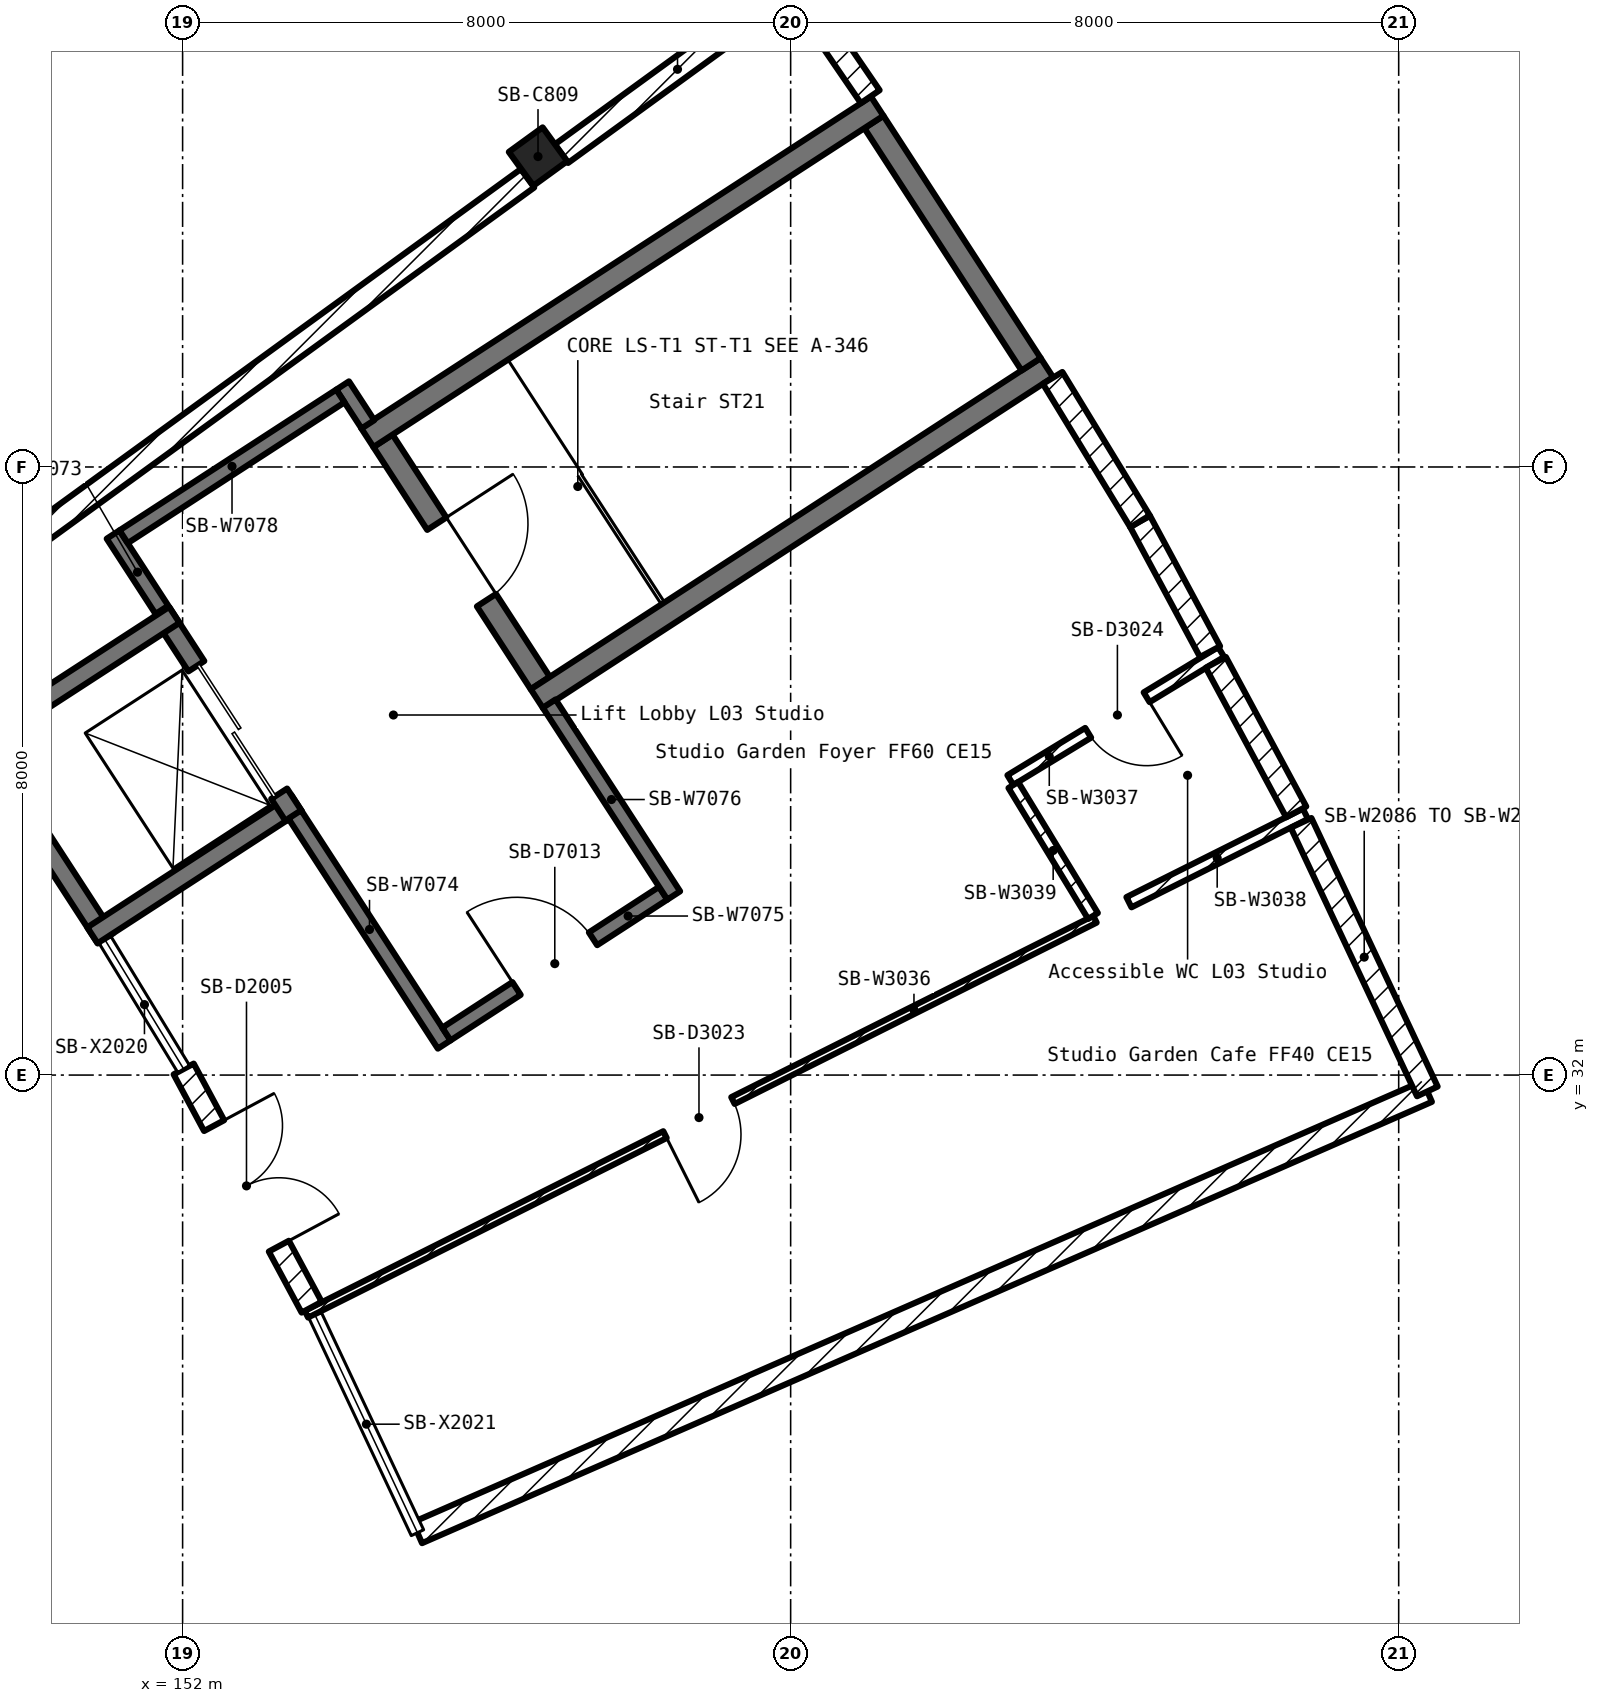
"""IFC4 building model, lengths in metres.
Left out: names, types, materials, properties, quantities, classifications, styles, units other than length and angle.
Written with IfcOpenShell. Run it as: python <this file> out.ifc"""

import sys

from ifc_helpers import new_model, si_unit, direction, frame, frame_2d, origin, origin_2d, place, context, subcontext, project, spatial, rectangle, extrude, element, fill, save


model = new_model("IFC4")
c1 = context("Model", 3, precision=1e-05, world=origin(), true_north=direction((0.0, 1.0)))
c2 = subcontext(c1, "Body", "Model", "MODEL_VIEW")
j1 = project(units=[si_unit("LENGTHUNIT", "METRE"), si_unit("PLANEANGLEUNIT", "RADIAN")], contexts=[c1])
p1 = place(None, origin())
s1 = spatial("IfcSite", under=j1, at=p1, CompositionType="ELEMENT")
p2 = place(p1, origin())
s2 = spatial("IfcBuilding", under=s1, at=p2, CompositionType="ELEMENT")
p3 = place(p2, frame((0.0, 0.0, 17.0)))
s3 = spatial("IfcBuildingStorey", under=s2, at=p3, CompositionType="ELEMENT", Elevation=17.0)
p4 = place(p3, frame((156.676, 44.084, 0.0), z_axis=(0.0, 0.0, 1.0), x_axis=(0.587785252292, -0.809016994375, 0.0)))
e1 = element("IfcColumn", 1, at=p4, inside=s3, PredefinedType="COLUMN", context=c2, shape_type="SweptSolid", body=[
    extrude(rectangle(XDim=0.55, YDim=0.55, at=origin_2d()), origin(), (0.0, 0.0, 1.0), 4.2),
])
p5 = place(p3, frame((149.708, 45.36, 0.0), z_axis=(0.0, 0.0, 1.0), x_axis=(0.766086094987, 0.642737967657, 0.0)))
e2 = element("IfcWall", 2, at=p5, inside=s3, PredefinedType="SOLIDWALL", context=c2, shape_type="SweptSolid", body=[
    extrude(rectangle(XDim=5.7, YDim=0.45, at=frame_2d((2.85, 0.0))), origin(), (0.0, 0.0, 1.0), 4.48),
])
p6 = place(p5, frame((1.85, 0.0, 1.0)))
e3 = element("IfcOpeningElement", 3, at=p6, cuts=e2, PredefinedType="OPENING", context=c2, shape_type="SweptSolid", body=[
    extrude(rectangle(XDim=2.0, YDim=2.8, at=frame_2d((1.0, 1.4))), frame((0.0, 0.237, 0.0), z_axis=(0.0, -1.0, 0.0), x_axis=(1.0, 0.0, 0.0)), (0.0, 0.0, 1.0), 0.474),
])
p7 = place(p3, frame((147.477, 28.401, 0.0), z_axis=(0.0, 0.0, 1.0), x_axis=(0.374633501724, -0.92717298245, 0.0)))
e4 = element("IfcWall", 4, at=p7, inside=s3, PredefinedType="PARAPET", context=c2, shape_type="SweptSolid", body=[
    extrude(rectangle(XDim=7.199, YDim=0.3, at=frame_2d((3.6, 0.0))), origin(), (0.0, 0.0, 1.0), 1.1),
])
p8 = place(p3, frame((154.636, 40.344, 0.0), z_axis=(0.0, 0.0, 1.0), x_axis=(0.544712834543, -0.838622637355, 0.0)))
e5 = element("IfcWall", 5, at=p8, inside=s3, PredefinedType="SOLIDWALL", context=c2, shape_type="SweptSolid", body=[
    extrude(rectangle(XDim=3.8, YDim=0.3, at=frame_2d((1.9, 0.0))), origin(), (0.0, 0.0, 1.0), 4.2),
])
p9 = place(p8, frame((1.3, 0.0, 0.0)))
e6 = element("IfcOpeningElement", 6, at=p9, cuts=e5, PredefinedType="OPENING", context=c2, shape_type="SweptSolid", body=[
    extrude(rectangle(XDim=1.2, YDim=2.1, at=frame_2d((0.6, 1.05))), frame((0.0, 0.162, 0.0), z_axis=(0.0, -1.0, 0.0), x_axis=(1.0, 0.0, 0.0)), (0.0, 0.0, 1.0), 0.324),
])
p10 = place(p3, frame((156.662, 36.95, 0.0), z_axis=(0.0, 0.0, 1.0), x_axis=(0.838666673849, 0.544645031351, 0.0)))
e7 = element("IfcWall", 7, at=p10, inside=s3, PredefinedType="SOLIDWALL", context=c2, shape_type="SweptSolid", body=[
    extrude(rectangle(XDim=8.0, YDim=0.3, at=frame_2d((4.0, 0.0))), origin(), (0.0, 0.0, 1.0), 4.2),
])
p11 = place(p3, frame((163.164, 41.351, 0.0), z_axis=(0.0, 0.0, 1.0), x_axis=(-0.544414712312, 0.838816202167, 0.0)))
e8 = element("IfcWall", 8, at=p11, inside=s3, PredefinedType="SOLIDWALL", context=c2, shape_type="SweptSolid", body=[
    extrude(rectangle(XDim=3.801, YDim=0.3, at=frame_2d((1.9, 0.0))), origin(), (0.0, 0.0, 1.0), 4.2),
])
p12 = place(p3, frame((161.139, 44.746, 0.0), z_axis=(0.0, 0.0, 1.0), x_axis=(-0.838633189021, -0.544696589187, 0.0)))
e9 = element("IfcWall", 9, at=p12, inside=s3, PredefinedType="SOLIDWALL", context=c2, shape_type="SweptSolid", body=[
    extrude(rectangle(XDim=8.001, YDim=0.3, at=frame_2d((4.0, 0.0))), origin(), (0.0, 0.0, 1.0), 4.2),
])
p13 = place(p3, frame((143.871, 44.123, 0.0), z_axis=(0.0, 0.0, 1.0), x_axis=(0.7070945738, 0.707118988363, 0.0)))
e10 = element("IfcWall", 10, at=p13, inside=s3, PredefinedType="SOLIDWALL", context=c2, shape_type="SweptSolid", body=[
    extrude(rectangle(XDim=10.0, YDim=0.3, at=frame_2d((5.0, 0.0))), origin(), (0.0, 0.0, 1.0), 5.5),
])
for number, where, z_axis, x_axis in (
    (11, (149.244, 36.485, 0.0), (0.0, 0.0, 1.0), (0.545, -0.839, 0.0)),
    (12, (150.814, 33.838, 0.0), (0.0, 0.0, 1.0), (0.839, 0.545, 0.0)),
):
    element("IfcWall", number, at=place(p3, frame(where, z_axis=z_axis, x_axis=x_axis)), inside=s3, PredefinedType="SOLIDWALL", context=c2, shape_type="SweptSolid", body=[
        extrude(rectangle(XDim=3.2, YDim=0.25, at=frame_2d((1.6, 0.0))), origin(), (0.0, 0.0, 1.0), 4.2),
    ])
p14 = place(p3, frame((153.461, 35.408, 0.0), z_axis=(0.0, 0.0, 1.0), x_axis=(-0.544746938909, 0.838600484467, 0.0)))
e13 = element("IfcWall", 13, at=p14, inside=s3, PredefinedType="SOLIDWALL", context=c2, shape_type="SweptSolid", body=[
    extrude(rectangle(XDim=3.199, YDim=0.25, at=frame_2d((1.6, 0.0))), origin(), (0.0, 0.0, 1.0), 4.2),
])
p15 = place(p14, frame((0.35, 0.0, 0.0)))
e14 = element("IfcOpeningElement", 14, at=p15, cuts=e13, PredefinedType="OPENING", context=c2, shape_type="SweptSolid", body=[
    extrude(rectangle(XDim=2.0, YDim=2.2, at=frame_2d((1.0, 1.1))), frame((0.0, 0.137, 0.0), z_axis=(0.0, -1.0, 0.0), x_axis=(1.0, 0.0, 0.0)), (0.0, 0.0, 1.0), 0.274),
])
p16 = place(p3, frame((151.891, 38.054, 0.0), z_axis=(0.0, 0.0, 1.0), x_axis=(-0.838830397361, -0.544392840201, 0.0)))
e15 = element("IfcWall", 15, at=p16, inside=s3, PredefinedType="SOLIDWALL", context=c2, shape_type="SweptSolid", body=[
    extrude(rectangle(XDim=3.2, YDim=0.25, at=frame_2d((1.6, 0.0))), origin(), (0.0, 0.0, 1.0), 4.2),
])
p17 = place(p3, frame((151.085, 39.111, 0.0), z_axis=(0.0, 0.0, 1.0), x_axis=(0.544733903653, -0.838608951903, 0.0)))
e16 = element("IfcWall", 16, at=p17, inside=s3, PredefinedType="PARTITIONING", context=c2, shape_type="SweptSolid", body=[
    extrude(rectangle(XDim=1.18, YDim=0.2, at=frame_2d((0.59, 0.0))), origin(), (0.0, 0.0, 1.0), 4.2),
])
p18 = place(p3, frame((153.476, 35.429, 0.0), z_axis=(0.0, 0.0, 1.0), x_axis=(0.544669706692, -0.838650648728, 0.0)))
e17 = element("IfcWall", 17, at=p18, inside=s3, PredefinedType="PARTITIONING", context=c2, shape_type="SweptSolid", body=[
    extrude(rectangle(XDim=3.609, YDim=0.2, at=frame_2d((1.805, 0.0))), origin(), (0.0, 0.0, 1.0), 4.2),
])
p19 = place(p3, frame((155.471, 32.54, 0.0), z_axis=(0.0, 0.0, 1.0), x_axis=(0.838683012783, 0.544619871167, 0.0)))
e18 = element("IfcWall", 18, at=p19, inside=s3, PredefinedType="PARTITIONING", context=c2, shape_type="SweptSolid", body=[
    extrude(rectangle(XDim=3.401, YDim=0.2, at=frame_2d((1.7, 0.0))), origin(), (0.0, 0.0, 1.0), 4.2),
])
p20 = place(p19, frame((1.1, 0.0, 0.0)))
e19 = element("IfcOpeningElement", 19, at=p20, cuts=e18, PredefinedType="OPENING", context=c2, shape_type="SweptSolid", body=[
    extrude(rectangle(XDim=1.2, YDim=2.1, at=frame_2d((0.6, 1.05))), frame((0.0, 0.112, 0.0), z_axis=(0.0, -1.0, 0.0), x_axis=(1.0, 0.0, 0.0)), (0.0, 0.0, 1.0), 0.224),
])
p21 = place(p3, frame((158.462, 34.363, 0.0), z_axis=(0.0, 0.0, 1.0), x_axis=(-0.544606183959, 0.838691900756, 0.0)))
e20 = element("IfcWall", 20, at=p21, inside=s3, PredefinedType="PARTITIONING", context=c2, shape_type="SweptSolid", body=[
    extrude(rectangle(XDim=3.009, YDim=0.2, at=frame_2d((1.505, 0.0))), origin(), (0.0, 0.0, 1.0), 4.2),
])
p22 = place(p3, frame((154.438, 40.561, 0.0), z_axis=(0.0, 0.0, 1.0), x_axis=(-0.545986914224, 0.837793703424, 0.0)))
e21 = element("IfcWall", 21, at=p22, inside=s3, PredefinedType="PARTITIONING", context=c2, shape_type="SweptSolid", body=[
    extrude(rectangle(XDim=0.61, YDim=0.2, at=frame_2d((0.305, 0.0))), origin(), (0.0, 0.0, 1.0), 4.2),
])
p23 = place(p3, frame((154.076, 40.934, 0.0), z_axis=(0.0, 0.0, 1.0), x_axis=(-0.838661716351, -0.544652665032, 0.0)))
e22 = element("IfcWall", 22, at=p23, inside=s3, PredefinedType="PARTITIONING", context=c2, shape_type="SweptSolid", body=[
    extrude(rectangle(XDim=3.4, YDim=0.2, at=frame_2d((1.7, 0.0))), origin(), (0.0, 0.0, 1.0), 4.2),
])
p24 = place(p3, frame((164.004, 34.05, 0.0), z_axis=(0.0, 0.0, 1.0), x_axis=(-0.894132431513, -0.447802629421, 0.0)))
e23 = element("IfcWall", 23, at=p24, inside=s3, PredefinedType="PARTITIONING", context=c2, shape_type="SweptSolid", body=[
    extrude(rectangle(XDim=11.604, YDim=0.1, at=frame_2d((5.802, 0.0))), origin(), (0.0, 0.0, 1.0), 3.3),
])
p25 = place(p24, frame((5.327, 0.0, 0.0)))
e24 = element("IfcOpeningElement", 24, at=p25, cuts=e23, PredefinedType="OPENING", context=c2, shape_type="SweptSolid", body=[
    extrude(rectangle(XDim=1.0, YDim=2.1, at=frame_2d((0.5, 1.05))), frame((0.0, 0.062, 0.0), z_axis=(0.0, -1.0, 0.0), x_axis=(1.0, 0.0, 0.0)), (0.0, 0.0, 1.0), 0.124),
])
p26 = place(p3, frame((165.664, 37.566, 0.0), z_axis=(0.0, 0.0, 1.0), x_axis=(-0.854618188907, -0.519256922139, 0.0)))
e25 = element("IfcWall", 25, at=p26, inside=s3, PredefinedType="PARTITIONING", context=c2, shape_type="SweptSolid", body=[
    extrude(rectangle(XDim=3.245, YDim=0.15, at=frame_2d((1.622, 0.0))), origin(), (0.0, 0.0, 1.0), 3.3),
])
p27 = place(p26, frame((1.147, 0.0, 0.0)))
e26 = element("IfcOpeningElement", 26, at=p27, cuts=e25, PredefinedType="OPENING", context=c2, shape_type="SweptSolid", body=[
    extrude(rectangle(XDim=0.9, YDim=2.1, at=frame_2d((0.45, 1.05))), frame((0.0, 0.087, 0.0), z_axis=(0.0, -1.0, 0.0), x_axis=(1.0, 0.0, 0.0)), (0.0, 0.0, 1.0), 0.174),
])
p28 = place(p3, frame((166.773, 35.436, 0.0), z_axis=(0.0, 0.0, 1.0), x_axis=(-0.894257884581, -0.447552048218, 0.0)))
e27 = element("IfcWall", 27, at=p28, inside=s3, PredefinedType="PARTITIONING", context=c2, shape_type="SweptSolid", body=[
    extrude(rectangle(XDim=2.597, YDim=0.15, at=frame_2d((1.298, 0.0))), origin(), (0.0, 0.0, 1.0), 3.3),
])
p29 = place(p3, frame((162.93, 35.816, 0.0), z_axis=(0.0, 0.0, 1.0), x_axis=(0.519720333425, -0.854336453059, 0.0)))
e28 = element("IfcWall", 28, at=p29, inside=s3, PredefinedType="PARTITIONING", context=c2, shape_type="SweptSolid", body=[
    extrude(rectangle(XDim=2.017, YDim=0.15, at=frame_2d((1.008, 0.0))), origin(), (0.0, 0.0, 1.0), 3.3),
])
p30 = place(p3, frame((160.04, 46.343, 0.0), z_axis=(0.0, 0.0, 1.0), x_axis=(-0.80891762334, -0.587922000481, 0.0)))
e29 = element("IfcWall", 29, at=p30, inside=s3, PredefinedType="SOLIDWALL", context=c2, shape_type="SweptSolid", body=[
    extrude(rectangle(XDim=3.779, YDim=0.3, at=frame_2d((1.89, 0.0))), origin(), (0.0, 0.0, 1.0), 4.2),
])
p31 = place(p3, frame((156.538, 43.798, 0.0), z_axis=(0.0, 0.0, 1.0), x_axis=(-0.809003782437, -0.587803436536, 0.0)))
e30 = element("IfcWall", 30, at=p31, inside=s3, PredefinedType="SOLIDWALL", context=c2, shape_type="SweptSolid", body=[
    extrude(rectangle(XDim=10.172, YDim=0.3, at=frame_2d((5.086, 0.0))), origin(), (0.0, 0.0, 1.0), 4.2),
])
p32 = place(p3, frame((152.014, 32.08, 0.0), z_axis=(0.0, 0.0, 1.0), x_axis=(0.473342621424, -0.880878404062, 0.0)))
e31 = element("IfcWall", 31, at=p32, inside=s3, PredefinedType="SOLIDWALL", context=c2, shape_type="SweptSolid", body=[
    extrude(rectangle(XDim=3.558, YDim=0.3, at=frame_2d((1.779, 0.0))), origin(), (0.0, 0.0, 1.0), 4.2),
])
p33 = place(p32, frame((0.846, 0.0, 0.0)))
e32 = element("IfcOpeningElement", 32, at=p33, cuts=e31, PredefinedType="OPENING", context=c2, shape_type="SweptSolid", body=[
    extrude(rectangle(XDim=1.8, YDim=2.4, at=frame_2d((0.9, 1.2))), frame((0.0, 0.162, 0.0), z_axis=(0.0, -1.0, 0.0), x_axis=(1.0, 0.0, 0.0)), (0.0, 0.0, 1.0), 0.324),
])
p34 = place(p3, frame((155.09, 25.979, 0.0), z_axis=(0.0, 0.0, 1.0), x_axis=(0.91633693282, 0.400408073781, 0.0)))
e33 = element("IfcWall", 33, at=p34, inside=s3, PredefinedType="SOLIDWALL", context=c2, shape_type="SweptSolid", body=[
    extrude(rectangle(XDim=14.5, YDim=0.3, at=frame_2d((7.25, 0.0))), origin(), (0.0, 0.0, 1.0), 4.2),
])
p35 = place(p3, frame((168.377, 31.785, 0.0), z_axis=(0.0, 0.0, 1.0), x_axis=(-0.425420553877, 0.904995774763, 0.0)))
e34 = element("IfcWall", 34, at=p35, inside=s3, PredefinedType="SOLIDWALL", context=c2, shape_type="SweptSolid", body=[
    extrude(rectangle(XDim=3.904, YDim=0.3, at=frame_2d((1.952, 0.0))), origin(), (0.0, 0.0, 1.0), 4.2),
])
p36 = place(p3, frame((166.652, 35.462, 0.0), z_axis=(0.0, 0.0, 1.0), x_axis=(-0.473545896083, 0.880769143591, 0.0)))
e35 = element("IfcWall", 35, at=p36, inside=s3, PredefinedType="SOLIDWALL", context=c2, shape_type="SweptSolid", body=[
    extrude(rectangle(XDim=2.234, YDim=0.3, at=frame_2d((1.117, 0.0))), origin(), (0.0, 0.0, 1.0), 4.2),
])
p37 = place(p3, frame((165.518, 37.571, 0.0), z_axis=(0.0, 0.0, 1.0), x_axis=(-0.473418775637, 0.880837478127, 0.0)))
e36 = element("IfcWall", 36, at=p37, inside=s3, PredefinedType="SOLIDWALL", context=c2, shape_type="SweptSolid", body=[
    extrude(rectangle(XDim=1.946, YDim=0.3, at=frame_2d((0.973, 0.0))), origin(), (0.0, 0.0, 1.0), 4.2),
])
p38 = place(p3, frame((164.597, 39.285, 0.0), z_axis=(0.0, 0.0, 1.0), x_axis=(-0.520332410011, 0.853963806664, 0.0)))
e37 = element("IfcWall", 37, at=p38, inside=s3, PredefinedType="SOLIDWALL", context=c2, shape_type="SweptSolid", body=[
    extrude(rectangle(XDim=2.21, YDim=0.3, at=frame_2d((1.105, 0.0))), origin(), (0.0, 0.0, 1.0), 4.2),
])
p39 = place(p3, frame((161.047, 44.872, 0.0), z_axis=(0.0, 0.0, 1.0), x_axis=(-0.564929371643, 0.825139264037, 0.0)))
e38 = element("IfcWall", 38, at=p39, inside=s3, PredefinedType="SOLIDWALL", context=c2, shape_type="SweptSolid", body=[
    extrude(rectangle(XDim=1.783, YDim=0.3, at=frame_2d((0.891, 0.0))), origin(), (0.0, 0.0, 1.0), 4.2),
])
p40 = place(p3, frame((160.04, 46.343, 4.5), z_axis=(0.0, 0.0, 1.0), x_axis=(-0.808987918733, -0.587825269399, 0.0)))
e39 = element("IfcWall", 39, at=p40, inside=s3, PredefinedType="PARAPET", context=c2, shape_type="SweptSolid", body=[
    extrude(rectangle(XDim=14.501, YDim=0.3, at=frame_2d((7.25, 0.0))), origin(), (0.0, 0.0, 1.0), 1.1),
])
p41 = place(p3, frame((152.014, 32.08, 4.5), z_axis=(0.0, 0.0, 1.0), x_axis=(0.473245174501, -0.880930760509, 0.0)))
e40 = element("IfcWall", 40, at=p41, inside=s3, PredefinedType="PARAPET", context=c2, shape_type="SweptSolid", body=[
    extrude(rectangle(XDim=3.493, YDim=0.3, at=frame_2d((1.747, 0.0))), origin(), (0.0, 0.0, 1.0), 1.1),
])
p42 = place(p3, frame((153.667, 29.003, 4.5), z_axis=(0.0, 0.0, 1.0), x_axis=(0.425814626448, -0.90481042429, 0.0)))
e41 = element("IfcWall", 41, at=p42, inside=s3, PredefinedType="PARAPET", context=c2, shape_type="SweptSolid", body=[
    extrude(rectangle(XDim=3.342, YDim=0.3, at=frame_2d((1.671, 0.0))), origin(), (0.0, 0.0, 1.0), 1.1),
])
p43 = place(p3, frame((155.09, 25.979, 4.5), z_axis=(0.0, 0.0, 1.0), x_axis=(0.91633693282, 0.400408073781, 0.0)))
e42 = element("IfcWall", 42, at=p43, inside=s3, PredefinedType="PARAPET", context=c2, shape_type="SweptSolid", body=[
    extrude(rectangle(XDim=14.5, YDim=0.3, at=frame_2d((7.25, 0.0))), origin(), (0.0, 0.0, 1.0), 1.1),
])
p44 = place(p3, frame((168.377, 31.785, 4.5), z_axis=(0.0, 0.0, 1.0), x_axis=(-0.425523477846, 0.904947385102, 0.0)))
e43 = element("IfcWall", 43, at=p44, inside=s3, PredefinedType="PARAPET", context=c2, shape_type="SweptSolid", body=[
    extrude(rectangle(XDim=4.126, YDim=0.3, at=frame_2d((2.063, 0.0))), origin(), (0.0, 0.0, 1.0), 1.1),
])
p45 = place(p3, frame((166.621, 35.519, 4.5), z_axis=(0.0, 0.0, 1.0), x_axis=(-0.473445882388, 0.880822908677, 0.0)))
e44 = element("IfcWall", 44, at=p45, inside=s3, PredefinedType="PARAPET", context=c2, shape_type="SweptSolid", body=[
    extrude(rectangle(XDim=4.275, YDim=0.3, at=frame_2d((2.138, 0.0))), origin(), (0.0, 0.0, 1.0), 1.1),
])
p46 = place(p9, origin())
e45 = element("IfcDoor", 45, at=p46, inside=s3, OperationType="SINGLE_SWING_LEFT", PredefinedType="DOOR", context=c2, shape_type="SweptSolid", body=[
    extrude(rectangle(XDim=1.2, YDim=2.1, at=frame_2d((0.6, 1.05))), frame((0.0, 0.025, 0.0), z_axis=(0.0, -1.0, 0.0), x_axis=(1.0, 0.0, 0.0)), (0.0, 0.0, 1.0), 0.05),
])
fill(e6, e45)
p47 = place(p15, origin())
e46 = element("IfcDoor", 46, at=p47, inside=s3, OperationType="DOUBLE_DOOR_SLIDING", PredefinedType="DOOR", context=c2, shape_type="SweptSolid", body=[
    extrude(rectangle(XDim=2.0, YDim=2.2, at=frame_2d((1.0, 1.1))), frame((0.0, 0.025, 0.0), z_axis=(0.0, -1.0, 0.0), x_axis=(1.0, 0.0, 0.0)), (0.0, 0.0, 1.0), 0.05),
])
fill(e14, e46)
p48 = place(p20, origin())
e47 = element("IfcDoor", 47, at=p48, inside=s3, OperationType="SINGLE_SWING_LEFT", PredefinedType="DOOR", context=c2, shape_type="SweptSolid", body=[
    extrude(rectangle(XDim=1.2, YDim=2.1, at=frame_2d((0.6, 1.05))), frame((0.0, 0.025, 0.0), z_axis=(0.0, -1.0, 0.0), x_axis=(1.0, 0.0, 0.0)), (0.0, 0.0, 1.0), 0.05),
])
fill(e19, e47)
p49 = place(p25, origin())
e48 = element("IfcDoor", 48, at=p49, inside=s3, OperationType="SINGLE_SWING_RIGHT", PredefinedType="DOOR", context=c2, shape_type="SweptSolid", body=[
    extrude(rectangle(XDim=1.0, YDim=2.1, at=frame_2d((0.5, 1.05))), frame((0.0, 0.025, 0.0), z_axis=(0.0, -1.0, 0.0), x_axis=(1.0, 0.0, 0.0)), (0.0, 0.0, 1.0), 0.05),
])
fill(e24, e48)
p50 = place(p27, origin())
e49 = element("IfcDoor", 49, at=p50, inside=s3, OperationType="SINGLE_SWING_LEFT", PredefinedType="DOOR", context=c2, shape_type="SweptSolid", body=[
    extrude(rectangle(XDim=0.9, YDim=2.1, at=frame_2d((0.45, 1.05))), frame((0.0, 0.025, 0.0), z_axis=(0.0, -1.0, 0.0), x_axis=(1.0, 0.0, 0.0)), (0.0, 0.0, 1.0), 0.05),
])
fill(e26, e49)
p51 = place(p33, origin())
e50 = element("IfcDoor", 50, at=p51, inside=s3, OperationType="DOUBLE_DOOR_DOUBLE_SWING", PredefinedType="DOOR", context=c2, shape_type="SweptSolid", body=[
    extrude(rectangle(XDim=1.8, YDim=2.4, at=frame_2d((0.9, 1.2))), frame((0.0, 0.025, 0.0), z_axis=(0.0, -1.0, 0.0), x_axis=(1.0, 0.0, 0.0)), (0.0, 0.0, 1.0), 0.05),
])
fill(e32, e50)
save(model, sys.argv[1])
